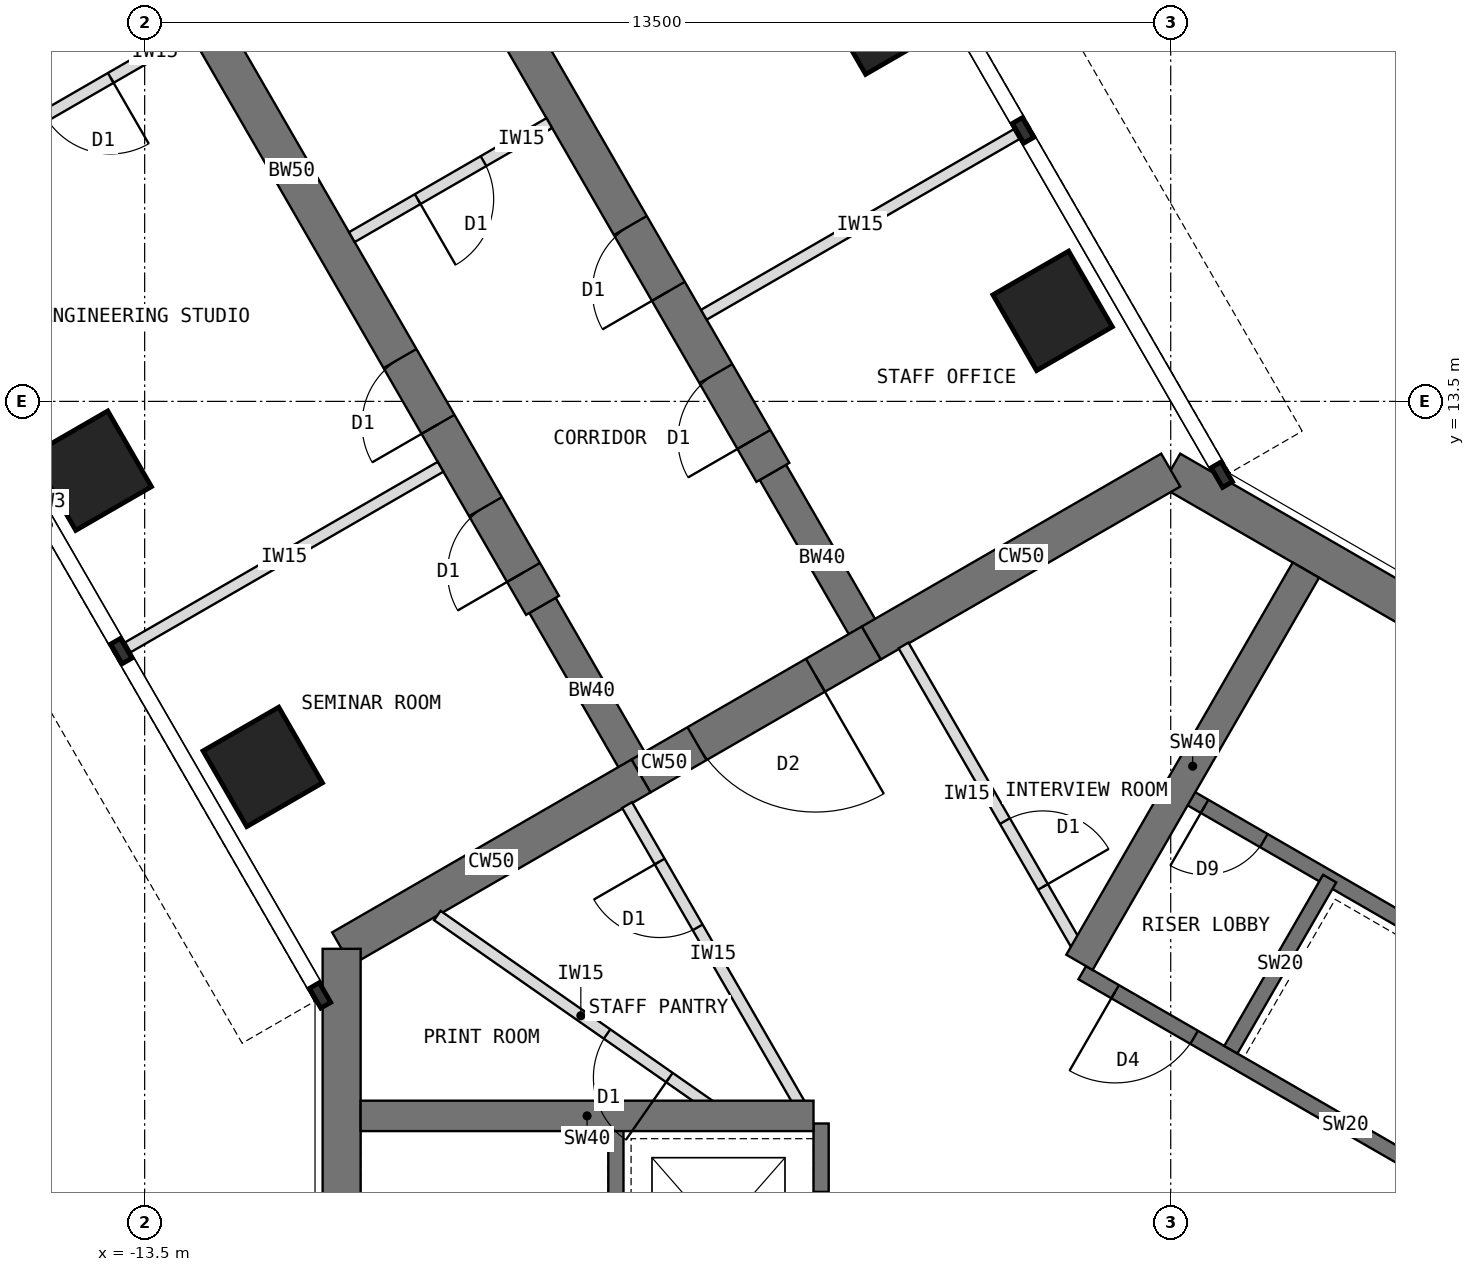
"""IFC4 building model, lengths in metres.
Left out: names, types, materials, properties, quantities, classifications, styles, units other than length and angle.
Written with IfcOpenShell. Run it as: python <this file> out.ifc"""

import sys

from ifc_helpers import new_model, si_unit, direction, frame, frame_2d, origin, origin_2d, place, context, subcontext, project, spatial, rectangle, extrude, element, fill, save


model = new_model("IFC4")
c1 = context("Model", 3, precision=1e-05, world=origin(), true_north=direction((0.0, 1.0)))
c2 = subcontext(c1, "Body", "Model", "MODEL_VIEW")
j1 = project(units=[si_unit("LENGTHUNIT", "METRE"), si_unit("PLANEANGLEUNIT", "RADIAN")], contexts=[c1])
p1 = place(None, origin())
s1 = spatial("IfcSite", under=j1, at=p1, CompositionType="ELEMENT")
p2 = place(p1, origin())
s2 = spatial("IfcBuilding", under=s1, at=p2, CompositionType="ELEMENT")
p3 = place(p2, frame((0.0, 0.0, 206.5)))
s3 = spatial("IfcBuildingStorey", under=s2, at=p3, CompositionType="ELEMENT", Elevation=206.5)
p4 = place(p3, frame((10.908, 6.298, 0.0), z_axis=(0.0, 0.0, 1.0), x_axis=(-0.866021940709, 0.500005998175, 0.0)))
e1 = element("IfcWall", 1, at=p4, inside=s3, PredefinedType="SHEAR", context=c2, shape_type="SweptSolid", body=[
    extrude(rectangle(XDim=12.596, YDim=0.5, at=frame_2d((6.298, 0.0))), origin(), (0.0, 0.0, 1.0), 4.0),
])
p5 = place(p3, frame((0.0, 12.596, 0.0), z_axis=(0.0, 0.0, 1.0), x_axis=(-0.866011268655, -0.500024481964, 0.0)))
e2 = element("IfcWall", 2, at=p5, inside=s3, PredefinedType="SHEAR", context=c2, shape_type="SweptSolid", body=[
    extrude(rectangle(XDim=4.548, YDim=0.5, at=frame_2d((2.274, 0.0))), origin(), (0.0, 0.0, 1.0), 4.0),
])
p6 = place(p3, frame((-3.939, 10.322, 0.0), z_axis=(0.0, 0.0, 1.0), x_axis=(-0.866019471182, -0.500010275428, 0.0)))
e3 = element("IfcWall", 3, at=p6, inside=s3, PredefinedType="SHEAR", context=c2, shape_type="SweptSolid", body=[
    extrude(rectangle(XDim=3.5, YDim=0.5, at=frame_2d((1.75, 0.0))), origin(), (0.0, 0.0, 1.0), 4.0),
])
p7 = place(p6, frame((0.85, 0.0, 0.0)))
e4 = element("IfcOpeningElement", 4, at=p7, cuts=e3, PredefinedType="OPENING", context=c2, shape_type="SweptSolid", body=[
    extrude(rectangle(XDim=1.8, YDim=2.1, at=frame_2d((0.9, 1.05))), frame((0.0, 0.26, 0.0), z_axis=(0.0, -1.0, 0.0), x_axis=(1.0, 0.0, 0.0)), (0.0, 0.0, 1.0), 0.52),
])
p8 = place(p3, frame((-6.97, 8.572, 0.0), z_axis=(0.0, 0.0, 1.0), x_axis=(-0.866034513004, -0.499984222037, 0.0)))
e5 = element("IfcWall", 5, at=p8, inside=s3, PredefinedType="SHEAR", context=c2, shape_type="SweptSolid", body=[
    extrude(rectangle(XDim=4.548, YDim=0.5, at=frame_2d((2.274, 0.0))), origin(), (0.0, 0.0, 1.0), 4.0),
])
p9 = place(p3, frame((-10.908, 6.298, 0.0), z_axis=(0.0, 0.0, 1.0), x_axis=(0.0, -1.0, 0.0)))
e6 = element("IfcWall", 6, at=p9, inside=s3, PredefinedType="SHEAR", context=c2, shape_type="SweptSolid", body=[
    extrude(rectangle(XDim=12.596, YDim=0.5, at=frame_2d((6.298, 0.0))), origin(), (0.0, 0.0, 1.0), 4.0),
])
p10 = place(p3, frame((-6.97, 8.572, 0.0), z_axis=(0.0, 0.0, 1.0), x_axis=(-0.499988811324, 0.866031863473, 0.0)))
e7 = element("IfcWall", 7, at=p10, inside=s3, PredefinedType="SHEAR", context=c2, shape_type="SweptSolid", body=[
    extrude(rectangle(XDim=2.592, YDim=0.4, at=frame_2d((1.296, 0.0))), origin(), (0.0, 0.0, 1.0), 4.0),
])
p11 = place(p3, frame((-8.266, 10.816, 0.0), z_axis=(0.0, 0.0, 1.0), x_axis=(-0.499996231654, 0.866027579429, 0.0)))
e8 = element("IfcWall", 8, at=p11, inside=s3, PredefinedType="SHEAR", context=c2, shape_type="SweptSolid", body=[
    extrude(rectangle(XDim=13.2, YDim=0.5, at=frame_2d((6.6, 0.0))), origin(), (0.0, 0.0, 1.0), 4.0),
])
p12 = place(p11, frame((0.5, 0.0, 0.0)))
e9 = element("IfcOpeningElement", 9, at=p12, cuts=e8, PredefinedType="OPENING", context=c2, shape_type="SweptSolid", body=[
    extrude(rectangle(XDim=1.0, YDim=2.1, at=frame_2d((0.5, 1.05))), frame((0.0, 0.26, 0.0), z_axis=(0.0, -1.0, 0.0), x_axis=(1.0, 0.0, 0.0)), (0.0, 0.0, 1.0), 0.52),
])
p13 = place(p11, frame((2.75, 0.0, 0.0)))
e10 = element("IfcOpeningElement", 10, at=p13, cuts=e8, PredefinedType="OPENING", context=c2, shape_type="SweptSolid", body=[
    extrude(rectangle(XDim=1.0, YDim=2.1, at=frame_2d((0.5, 1.05))), frame((0.0, 0.26, 0.0), z_axis=(0.0, -1.0, 0.0), x_axis=(1.0, 0.0, 0.0)), (0.0, 0.0, 1.0), 0.52),
])
p14 = place(p3, frame((-3.939, 10.322, 0.0), z_axis=(0.0, 0.0, 1.0), x_axis=(-0.499918158782, 0.866072649678, 0.0)))
e11 = element("IfcWall", 11, at=p14, inside=s3, PredefinedType="SHEAR", context=c2, shape_type="SweptSolid", body=[
    extrude(rectangle(XDim=2.592, YDim=0.4, at=frame_2d((1.296, 0.0))), origin(), (0.0, 0.0, 1.0), 4.0),
])
p15 = place(p3, frame((-5.234, 12.566, 0.0), z_axis=(0.0, 0.0, 1.0), x_axis=(-0.500010103361, 0.866019570528, 0.0)))
e12 = element("IfcWall", 12, at=p15, inside=s3, PredefinedType="SHEAR", context=c2, shape_type="SweptSolid", body=[
    extrude(rectangle(XDim=13.2, YDim=0.5, at=frame_2d((6.6, 0.0))), origin(), (0.0, 0.0, 1.0), 4.0),
])
p16 = place(p15, frame((0.5, 0.0, 0.0)))
e13 = element("IfcOpeningElement", 13, at=p16, cuts=e12, PredefinedType="OPENING", context=c2, shape_type="SweptSolid", body=[
    extrude(rectangle(XDim=1.0, YDim=2.1, at=frame_2d((0.5, 1.05))), frame((0.0, 0.26, 0.0), z_axis=(0.0, -1.0, 0.0), x_axis=(1.0, 0.0, 0.0)), (0.0, 0.0, 1.0), 0.52),
])
p17 = place(p15, frame((2.75, 0.0, 0.0)))
e14 = element("IfcOpeningElement", 14, at=p17, cuts=e12, PredefinedType="OPENING", context=c2, shape_type="SweptSolid", body=[
    extrude(rectangle(XDim=1.0, YDim=2.1, at=frame_2d((0.5, 1.05))), frame((0.0, 0.26, 0.0), z_axis=(0.0, -1.0, 0.0), x_axis=(1.0, 0.0, 0.0)), (0.0, 0.0, 1.0), 0.52),
])
for number, where, z_axis, x_axis in (
    (15, (-11.946, 8.691, 0.0), (0.0, 0.0, 1.0), (0.866, 0.5, 0.0)),
    (16, (-1.554, 14.691, 0.0), (0.0, 0.0, 1.0), (0.866, 0.5, 0.0)),
    (17, (-14.196, 12.588, 0.0), (0.0, 0.0, 1.0), (0.866, 0.5, 0.0)),
    (18, (-3.804, 18.588, 0.0), (0.0, 0.0, 1.0), (0.866, 0.5, 0.0)),
):
    element("IfcColumn", number, at=place(p3, frame(where, z_axis=z_axis, x_axis=x_axis)), inside=s3, PredefinedType="COLUMN", context=c2, shape_type="SweptSolid", body=[
        extrude(rectangle(XDim=1.15, YDim=1.15, at=origin_2d()), origin(), (0.0, 0.0, 1.0), 4.0),
    ])
p18 = place(p3, frame((5.764, 1.984, 0.0), z_axis=(0.0, 0.0, 1.0), x_axis=(-0.866026010844, 0.49999894854, 0.0)))
e19 = element("IfcWall", 19, at=p18, inside=s3, PredefinedType="SHEAR", context=c2, shape_type="SweptSolid", body=[
    extrude(rectangle(XDim=8.0, YDim=0.2, at=frame_2d((4.0, 0.0))), origin(), (0.0, 0.0, 1.0), 4.0),
])
p19 = place(p18, frame((6.3, 0.0, 0.0)))
e20 = element("IfcOpeningElement", 20, at=p19, cuts=e19, PredefinedType="OPENING", context=c2, shape_type="SweptSolid", body=[
    extrude(rectangle(XDim=1.2, YDim=2.1, at=frame_2d((0.6, 1.05))), frame((0.0, 0.11, 0.0), z_axis=(0.0, -1.0, 0.0), x_axis=(1.0, 0.0, 0.0)), (0.0, 0.0, 1.0), 0.22),
])
p20 = place(p3, frame((0.791, 4.97, 0.0), z_axis=(0.0, 0.0, 1.0), x_axis=(0.499936506574, 0.866062058628, 0.0)))
e21 = element("IfcWall", 21, at=p20, inside=s3, PredefinedType="SHEAR", context=c2, shape_type="SweptSolid", body=[
    extrude(rectangle(XDim=2.6, YDim=0.2, at=frame_2d((1.3, 0.0))), origin(), (0.0, 0.0, 1.0), 4.0),
])
p21 = place(p3, frame((7.114, 4.322, 0.0), z_axis=(0.0, 0.0, 1.0), x_axis=(-0.866026010844, 0.49999894854, 0.0)))
e22 = element("IfcWall", 22, at=p21, inside=s3, PredefinedType="SHEAR", context=c2, shape_type="SweptSolid", body=[
    extrude(rectangle(XDim=8.0, YDim=0.2, at=frame_2d((4.0, 0.0))), origin(), (0.0, 0.0, 1.0), 4.0),
])
p22 = place(p21, frame((6.8, 0.0, 0.0)))
e23 = element("IfcOpeningElement", 23, at=p22, cuts=e22, PredefinedType="OPENING", context=c2, shape_type="SweptSolid", body=[
    extrude(rectangle(XDim=0.9, YDim=2.1, at=frame_2d((0.45, 1.05))), frame((0.0, 0.11, 0.0), z_axis=(0.0, -1.0, 0.0), x_axis=(1.0, 0.0, 0.0)), (0.0, 0.0, 1.0), 0.22),
])
p23 = place(p3, frame((-1.201, 6.12, 0.0), z_axis=(0.0, 0.0, 1.0), x_axis=(0.500021575205, 0.866012946976, 0.0)))
e24 = element("IfcWall", 24, at=p23, inside=s3, PredefinedType="SHEAR", context=c2, shape_type="SweptSolid", body=[
    extrude(rectangle(XDim=5.958, YDim=0.4, at=frame_2d((2.979, 0.0))), origin(), (0.0, 0.0, 1.0), 4.0),
])
p24 = place(p3, frame((-4.6, 4.0, 0.0), z_axis=(0.0, 0.0, 1.0), x_axis=(0.0, -1.0, 0.0)))
e25 = element("IfcWall", 25, at=p24, inside=s3, PredefinedType="SHEAR", context=c2, shape_type="SweptSolid", body=[
    extrude(rectangle(XDim=8.0, YDim=0.2, at=frame_2d((4.0, 0.0))), origin(), (0.0, 0.0, 1.0), 4.0),
])
p25 = place(p24, frame((6.3, 0.0, 0.0)))
e26 = element("IfcOpeningElement", 26, at=p25, cuts=e25, PredefinedType="OPENING", context=c2, shape_type="SweptSolid", body=[
    extrude(rectangle(XDim=1.2, YDim=2.1, at=frame_2d((0.6, 1.05))), frame((0.0, 0.11, 0.0), z_axis=(0.0, -1.0, 0.0), x_axis=(1.0, 0.0, 0.0)), (0.0, 0.0, 1.0), 0.22),
])
p26 = place(p24, frame((0.9, 0.0, 0.0)))
e27 = element("IfcOpeningElement", 27, at=p26, cuts=e25, PredefinedType="OPENING", context=c2, shape_type="SweptSolid", body=[
    extrude(rectangle(XDim=1.1, YDim=2.2, at=frame_2d((0.55, 1.1))), frame((0.0, 0.11, 0.0), z_axis=(0.0, -1.0, 0.0), x_axis=(1.0, 0.0, 0.0)), (0.0, 0.0, 1.0), 0.22),
])
p27 = place(p3, frame((-7.3, 4.0, 0.0), z_axis=(0.0, 0.0, 1.0), x_axis=(0.0, -1.0, 0.0)))
e28 = element("IfcWall", 28, at=p27, inside=s3, PredefinedType="SHEAR", context=c2, shape_type="SweptSolid", body=[
    extrude(rectangle(XDim=8.0, YDim=0.2, at=frame_2d((4.0, 0.0))), origin(), (0.0, 0.0, 1.0), 4.0),
])
p28 = place(p27, frame((6.7, 0.0, 0.0)))
e29 = element("IfcOpeningElement", 29, at=p28, cuts=e28, PredefinedType="OPENING", context=c2, shape_type="SweptSolid", body=[
    extrude(rectangle(XDim=1.1, YDim=2.1, at=frame_2d((0.55, 1.05))), frame((0.0, 0.11, 0.0), z_axis=(0.0, -1.0, 0.0), x_axis=(1.0, 0.0, 0.0)), (0.0, 0.0, 1.0), 0.22),
])
p29 = place(p3, frame((-4.7, 4.1, 0.0), z_axis=(0.0, 0.0, 1.0), x_axis=(-1.0, 0.0, 0.0)))
e30 = element("IfcWall", 30, at=p29, inside=s3, PredefinedType="SHEAR", context=c2, shape_type="SweptSolid", body=[
    extrude(rectangle(XDim=5.958, YDim=0.4, at=frame_2d((2.979, 0.0))), origin(), (0.0, 0.0, 1.0), 4.0),
])
p30 = place(p3, frame((-9.607, 12.64, 0.0), z_axis=(0.0, 0.0, 1.0), x_axis=(-0.866033238375, -0.499986429846, 0.0)))
e31 = element("IfcWall", 31, at=p30, inside=s3, PredefinedType="PARTITIONING", context=c2, shape_type="SweptSolid", body=[
    extrude(rectangle(XDim=4.75, YDim=0.15, at=frame_2d((2.375, 0.0))), origin(), (0.0, 0.0, 1.0), 3.8),
])
p31 = place(p3, frame((-12.907, 18.356, 0.0), z_axis=(0.0, 0.0, 1.0), x_axis=(-0.866038511948, -0.499977295307, 0.0)))
e32 = element("IfcWall", 32, at=p31, inside=s3, PredefinedType="PARTITIONING", context=c2, shape_type="SweptSolid", body=[
    extrude(rectangle(XDim=3.4, YDim=0.15, at=frame_2d((1.7, 0.0))), origin(), (0.0, 0.0, 1.0), 3.8),
])
p32 = place(p31, frame((1.2, 0.0, 0.0)))
e33 = element("IfcOpeningElement", 33, at=p32, cuts=e32, PredefinedType="OPENING", context=c2, shape_type="SweptSolid", body=[
    extrude(rectangle(XDim=1.0, YDim=2.1, at=frame_2d((0.5, 1.05))), frame((0.0, 0.085, 0.0), z_axis=(0.0, -1.0, 0.0), x_axis=(1.0, 0.0, 0.0)), (0.0, 0.0, 1.0), 0.17),
])
p33 = place(p3, frame((-6.143, 14.64, 0.0), z_axis=(0.0, 0.0, 1.0), x_axis=(0.866033238375, 0.499986429846, 0.0)))
e34 = element("IfcWall", 34, at=p33, inside=s3, PredefinedType="PARTITIONING", context=c2, shape_type="SweptSolid", body=[
    extrude(rectangle(XDim=4.75, YDim=0.15, at=frame_2d((2.375, 0.0))), origin(), (0.0, 0.0, 1.0), 3.8),
])
p34 = place(p3, frame((-4.89, 4.27, 0.0), z_axis=(0.0, 0.0, 1.0), x_axis=(-0.500032211057, 0.866006805923, 0.0)))
e35 = element("IfcWall", 35, at=p34, inside=s3, PredefinedType="PARTITIONING", context=c2, shape_type="SweptSolid", body=[
    extrude(rectangle(XDim=4.526, YDim=0.15, at=frame_2d((2.263, 0.0))), origin(), (0.0, 0.0, 1.0), 3.8),
])
p35 = place(p34, frame((2.668, 0.0, 0.0)))
e36 = element("IfcOpeningElement", 36, at=p35, cuts=e35, PredefinedType="OPENING", context=c2, shape_type="SweptSolid", body=[
    extrude(rectangle(XDim=1.0, YDim=2.1, at=frame_2d((0.5, 1.05))), frame((0.0, 0.085, 0.0), z_axis=(0.0, -1.0, 0.0), x_axis=(1.0, 0.0, 0.0)), (0.0, 0.0, 1.0), 0.17),
])
p36 = place(p3, frame((-3.515, 10.289, 0.0), z_axis=(0.0, 0.0, 1.0), x_axis=(0.499968392031, -0.866043651885, 0.0)))
e37 = element("IfcWall", 37, at=p36, inside=s3, PredefinedType="PARTITIONING", context=c2, shape_type="SweptSolid", body=[
    extrude(rectangle(XDim=4.526, YDim=0.15, at=frame_2d((2.263, 0.0))), origin(), (0.0, 0.0, 1.0), 3.8),
])
p37 = place(p36, frame((2.668, 0.0, 0.0)))
e38 = element("IfcOpeningElement", 38, at=p37, cuts=e37, PredefinedType="OPENING", context=c2, shape_type="SweptSolid", body=[
    extrude(rectangle(XDim=1.0, YDim=2.1, at=frame_2d((0.5, 1.05))), frame((0.0, 0.085, 0.0), z_axis=(0.0, -1.0, 0.0), x_axis=(1.0, 0.0, 0.0)), (0.0, 0.0, 1.0), 0.17),
])
p38 = place(p3, frame((-5.873, 4.1, 0.0), z_axis=(0.0, 0.0, 1.0), x_axis=(-0.819975923972, 0.572398011969, 0.0)))
e39 = element("IfcWall", 39, at=p38, inside=s3, PredefinedType="PARTITIONING", context=c2, shape_type="SweptSolid", body=[
    extrude(rectangle(XDim=4.605, YDim=0.15, at=frame_2d((2.303, 0.0))), origin(), (0.0, 0.0, 1.0), 3.8),
])
p39 = place(p38, frame((0.882, 0.0, 0.0)))
e40 = element("IfcOpeningElement", 40, at=p39, cuts=e39, PredefinedType="OPENING", context=c2, shape_type="SweptSolid", body=[
    extrude(rectangle(XDim=1.0, YDim=2.1, at=frame_2d((0.5, 1.05))), frame((0.0, 0.085, 0.0), z_axis=(0.0, -1.0, 0.0), x_axis=(1.0, 0.0, 0.0)), (0.0, 0.0, 1.0), 0.17),
])
p40 = place(p3, frame((-8.176, 17.161, 0.0), z_axis=(0.0, 0.0, 1.0), x_axis=(-0.866010750942, -0.50002537861, 0.0)))
e41 = element("IfcWall", 41, at=p40, inside=s3, PredefinedType="PARTITIONING", context=c2, shape_type="SweptSolid", body=[
    extrude(rectangle(XDim=3.0, YDim=0.15, at=frame_2d((1.5, 0.0))), origin(), (0.0, 0.0, 1.0), 3.8),
])
p41 = place(p40, frame((1.0, 0.0, 0.0)))
e42 = element("IfcOpeningElement", 42, at=p41, cuts=e41, PredefinedType="OPENING", context=c2, shape_type="SweptSolid", body=[
    extrude(rectangle(XDim=1.0, YDim=2.1, at=frame_2d((0.5, 1.05))), frame((0.0, 0.085, 0.0), z_axis=(0.0, -1.0, 0.0), x_axis=(1.0, 0.0, 0.0)), (0.0, 0.0, 1.0), 0.17),
])
p42 = place(p19, origin())
e43 = element("IfcDoor", 43, at=p42, inside=s3, OperationType="SINGLE_SWING_RIGHT", PredefinedType="DOOR", context=c2, shape_type="SweptSolid", body=[
    extrude(rectangle(XDim=1.2, YDim=2.1, at=frame_2d((0.6, 1.05))), frame((0.0, 0.025, 0.0), z_axis=(0.0, -1.0, 0.0), x_axis=(1.0, 0.0, 0.0)), (0.0, 0.0, 1.0), 0.05),
])
fill(e20, e43)
p43 = place(p22, origin())
e44 = element("IfcDoor", 44, at=p43, inside=s3, OperationType="SINGLE_SWING_RIGHT", PredefinedType="DOOR", context=c2, shape_type="SweptSolid", body=[
    extrude(rectangle(XDim=0.9, YDim=2.1, at=frame_2d((0.45, 1.05))), frame((0.0, 0.025, 0.0), z_axis=(0.0, -1.0, 0.0), x_axis=(1.0, 0.0, 0.0)), (0.0, 0.0, 1.0), 0.05),
])
fill(e23, e44)
p44 = place(p7, origin())
e45 = element("IfcDoor", 45, at=p44, inside=s3, OperationType="DOUBLE_DOOR_DOUBLE_SWING", PredefinedType="DOOR", context=c2, shape_type="SweptSolid", body=[
    extrude(rectangle(XDim=1.8, YDim=2.1, at=frame_2d((0.9, 1.05))), frame((0.0, 0.025, 0.0), z_axis=(0.0, -1.0, 0.0), x_axis=(1.0, 0.0, 0.0)), (0.0, 0.0, 1.0), 0.05),
])
fill(e4, e45)
p45 = place(p32, origin())
e46 = element("IfcDoor", 46, at=p45, inside=s3, OperationType="SINGLE_SWING_LEFT", PredefinedType="DOOR", context=c2, shape_type="SweptSolid", body=[
    extrude(rectangle(XDim=1.0, YDim=2.1, at=frame_2d((0.5, 1.05))), frame((0.0, 0.025, 0.0), z_axis=(0.0, -1.0, 0.0), x_axis=(1.0, 0.0, 0.0)), (0.0, 0.0, 1.0), 0.05),
])
fill(e33, e46)
p46 = place(p37, origin())
e47 = element("IfcDoor", 47, at=p46, inside=s3, OperationType="SINGLE_SWING_RIGHT", PredefinedType="DOOR", context=c2, shape_type="SweptSolid", body=[
    extrude(rectangle(XDim=1.0, YDim=2.1, at=frame_2d((0.5, 1.05))), frame((0.0, 0.025, 0.0), z_axis=(0.0, -1.0, 0.0), x_axis=(1.0, 0.0, 0.0)), (0.0, 0.0, 1.0), 0.05),
])
fill(e38, e47)
p47 = place(p39, origin())
e48 = element("IfcDoor", 48, at=p47, inside=s3, OperationType="SINGLE_SWING_LEFT", PredefinedType="DOOR", context=c2, shape_type="SweptSolid", body=[
    extrude(rectangle(XDim=1.0, YDim=2.1, at=frame_2d((0.5, 1.05))), frame((0.0, 0.025, 0.0), z_axis=(0.0, -1.0, 0.0), x_axis=(1.0, 0.0, 0.0)), (0.0, 0.0, 1.0), 0.05),
])
fill(e40, e48)
p48 = place(p35, origin())
e49 = element("IfcDoor", 49, at=p48, inside=s3, OperationType="SINGLE_SWING_RIGHT", PredefinedType="DOOR", context=c2, shape_type="SweptSolid", body=[
    extrude(rectangle(XDim=1.0, YDim=2.1, at=frame_2d((0.5, 1.05))), frame((0.0, 0.025, 0.0), z_axis=(0.0, -1.0, 0.0), x_axis=(1.0, 0.0, 0.0)), (0.0, 0.0, 1.0), 0.05),
])
fill(e36, e49)
p49 = place(p41, origin())
e50 = element("IfcDoor", 50, at=p49, inside=s3, OperationType="SINGLE_SWING_RIGHT", PredefinedType="DOOR", context=c2, shape_type="SweptSolid", body=[
    extrude(rectangle(XDim=1.0, YDim=2.1, at=frame_2d((0.5, 1.05))), frame((0.0, 0.025, 0.0), z_axis=(0.0, -1.0, 0.0), x_axis=(1.0, 0.0, 0.0)), (0.0, 0.0, 1.0), 0.05),
])
fill(e42, e50)
p50 = place(p12, origin())
e51 = element("IfcDoor", 51, at=p50, inside=s3, OperationType="SINGLE_SWING_LEFT", PredefinedType="DOOR", context=c2, shape_type="SweptSolid", body=[
    extrude(rectangle(XDim=1.0, YDim=2.1, at=frame_2d((0.5, 1.05))), frame((0.0, 0.025, 0.0), z_axis=(0.0, -1.0, 0.0), x_axis=(1.0, 0.0, 0.0)), (0.0, 0.0, 1.0), 0.05),
])
fill(e9, e51)
p51 = place(p13, origin())
e52 = element("IfcDoor", 52, at=p51, inside=s3, OperationType="SINGLE_SWING_LEFT", PredefinedType="DOOR", context=c2, shape_type="SweptSolid", body=[
    extrude(rectangle(XDim=1.0, YDim=2.1, at=frame_2d((0.5, 1.05))), frame((0.0, 0.025, 0.0), z_axis=(0.0, -1.0, 0.0), x_axis=(1.0, 0.0, 0.0)), (0.0, 0.0, 1.0), 0.05),
])
fill(e10, e52)
p52 = place(p16, origin())
e53 = element("IfcDoor", 53, at=p52, inside=s3, OperationType="SINGLE_SWING_LEFT", PredefinedType="DOOR", context=c2, shape_type="SweptSolid", body=[
    extrude(rectangle(XDim=1.0, YDim=2.1, at=frame_2d((0.5, 1.05))), frame((0.0, 0.025, 0.0), z_axis=(0.0, -1.0, 0.0), x_axis=(1.0, 0.0, 0.0)), (0.0, 0.0, 1.0), 0.05),
])
fill(e13, e53)
p53 = place(p17, origin())
e54 = element("IfcDoor", 54, at=p53, inside=s3, OperationType="SINGLE_SWING_LEFT", PredefinedType="DOOR", context=c2, shape_type="SweptSolid", body=[
    extrude(rectangle(XDim=1.0, YDim=2.1, at=frame_2d((0.5, 1.05))), frame((0.0, 0.025, 0.0), z_axis=(0.0, -1.0, 0.0), x_axis=(1.0, 0.0, 0.0)), (0.0, 0.0, 1.0), 0.05),
])
fill(e14, e54)
save(model, sys.argv[1])
